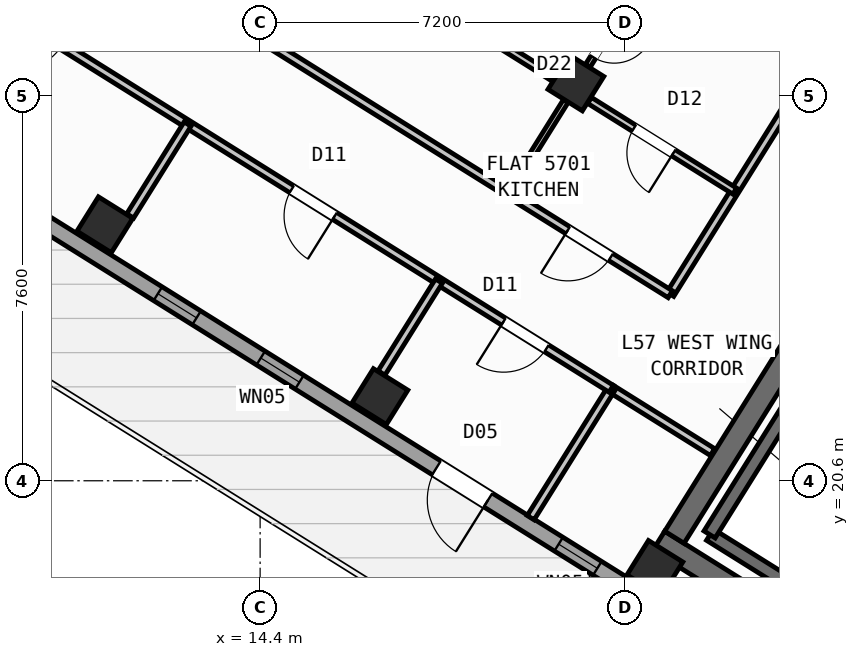
"""IFC4 building model, lengths in metres.
Left out: names, types, materials, properties, quantities, classifications, styles, units other than length and angle.
Written with IfcOpenShell. Run it as: python <this file> out.ifc"""

import sys

from ifc_helpers import new_model, si_unit, direction, frame, frame_2d, origin, origin_2d, place, context, subcontext, project, spatial, rectangle, hollow_rectangle, extrude, source, transform, mapped, element, fill, save


model = new_model("IFC4")
c1 = context("Model", 3, precision=1e-05, world=origin(), true_north=direction((0.0, 1.0)))
c2 = subcontext(c1, "Body", "Model", "MODEL_VIEW")
j1 = project(units=[si_unit("LENGTHUNIT", "METRE"), si_unit("PLANEANGLEUNIT", "RADIAN")], contexts=[c1])
p1 = place(None, origin())
s1 = spatial("IfcSite", under=j1, at=p1, CompositionType="ELEMENT")
p2 = place(p1, origin())
s2 = spatial("IfcBuilding", under=s1, at=p2, CompositionType="ELEMENT")
p3 = place(p2, frame((0.0, 0.0, 225.6)))
s3 = spatial("IfcBuildingStorey", under=s2, at=p3, CompositionType="ELEMENT", Elevation=225.6)
p4 = place(p3, frame((33.324, 12.503, 0.0), z_axis=(0.0, 0.0, 1.0), x_axis=(-0.848043529849, 0.529926571782, 0.0)))
e1 = element("IfcWall", 1, at=p4, inside=s3, PredefinedType="SHEAR", context=c2, shape_type="SweptSolid", body=[
    extrude(rectangle(XDim=13.04, YDim=0.45, at=frame_2d((6.52, 0.0))), origin(), (0.0, 0.0, 1.0), 3.35),
])
p5 = place(p3, frame((26.007, 24.976, 0.0), z_axis=(0.0, 0.0, 1.0), x_axis=(-0.529931155655, -0.848040665456, 0.0)))
e2 = element("IfcWall", 2, at=p5, inside=s3, PredefinedType="SHEAR", context=c2, shape_type="SweptSolid", body=[
    extrude(rectangle(XDim=6.475, YDim=0.45, at=frame_2d((3.238, 0.0))), origin(), (0.0, 0.0, 1.0), 3.35),
])
m1 = source(origin(), c2, "Body", "SweptSolid", [
    extrude(hollow_rectangle(XDim=0.8, YDim=0.8, WallThickness=0.032, at=origin_2d()), origin(), (0.0, 0.0, 1.0), 3.6),
])
for number, where, z_axis, x_axis in (
    (3, (22.191, 18.87, 0.0), (0.0, 0.0, 1.0), (-0.848, 0.53, 0.0)),
    (4, (20.632, 28.452, 0.0), (0.0, 0.0, 1.0), (-0.848, 0.53, 0.0)),
    (5, (16.764, 22.261, 0.0), (0.0, 0.0, 1.0), (-0.848, 0.53, 0.0)),
    (6, (11.336, 25.653, 0.0), (0.0, 0.0, 1.0), (-0.848, 0.53, 0.0)),
):
    element("IfcColumn", number, at=place(p3, frame(where, z_axis=z_axis, x_axis=x_axis)), inside=s3, PredefinedType="COLUMN", context=c2, shape_type="MappedRepresentation", body=[
        mapped(m1, transform((0.0, 0.0, 0.0), scale=1.0)),
    ])
p6 = place(p3, frame((31.76, 12.183, 0.0), z_axis=(0.0, 0.0, 1.0), x_axis=(-0.848047074256, 0.529920899612, 0.0)))
e7 = element("IfcWall", 7, at=p6, inside=s3, PredefinedType="STANDARD", context=c2, shape_type="SweptSolid", body=[
    extrude(rectangle(XDim=30.652, YDim=0.32, at=frame_2d((15.326, 0.0))), origin(), (0.0, 0.0, 1.0), 3.35),
])
p7 = place(p6, frame((15.166, 0.0, 0.0)))
e8 = element("IfcOpeningElement", 8, at=p7, cuts=e7, PredefinedType="OPENING", context=c2, shape_type="SweptSolid", body=[
    extrude(rectangle(XDim=1.2, YDim=2.15, at=frame_2d((0.6, 1.075))), frame((0.0, 0.17, 0.0), z_axis=(0.0, -1.0, 0.0), x_axis=(1.0, 0.0, 0.0)), (0.0, 0.0, 1.0), 0.34),
])
p8 = place(p6, frame((2.24, 0.0, 0.9)))
e9 = element("IfcOpeningElement", 9, at=p8, cuts=e7, PredefinedType="OPENING", context=c2, shape_type="SweptSolid", body=[
    extrude(rectangle(XDim=1.65, YDim=1.45, at=frame_2d((0.825, 0.725))), frame((0.0, 0.17, 0.0), z_axis=(0.0, -1.0, 0.0), x_axis=(1.0, 0.0, 0.0)), (0.0, 0.0, 1.0), 0.34),
])
p9 = place(p6, frame((7.469, 0.0, 0.9)))
e10 = element("IfcOpeningElement", 10, at=p9, cuts=e7, PredefinedType="OPENING", context=c2, shape_type="SweptSolid", body=[
    extrude(rectangle(XDim=1.65, YDim=1.45, at=frame_2d((0.825, 0.725))), frame((0.0, 0.17, 0.0), z_axis=(0.0, -1.0, 0.0), x_axis=(1.0, 0.0, 0.0)), (0.0, 0.0, 1.0), 0.34),
])
p10 = place(p6, frame((12.623, 0.0, 1.0)))
e11 = element("IfcOpeningElement", 11, at=p10, cuts=e7, PredefinedType="OPENING", context=c2, shape_type="SweptSolid", body=[
    extrude(rectangle(XDim=0.9, YDim=1.25, at=frame_2d((0.45, 0.625))), frame((0.0, 0.17, 0.0), z_axis=(0.0, -1.0, 0.0), x_axis=(1.0, 0.0, 0.0)), (0.0, 0.0, 1.0), 0.34),
])
p11 = place(p6, frame((19.556, 0.0, 1.0)))
e12 = element("IfcOpeningElement", 12, at=p11, cuts=e7, PredefinedType="OPENING", context=c2, shape_type="SweptSolid", body=[
    extrude(rectangle(XDim=0.9, YDim=1.25, at=frame_2d((0.45, 0.625))), frame((0.0, 0.17, 0.0), z_axis=(0.0, -1.0, 0.0), x_axis=(1.0, 0.0, 0.0)), (0.0, 0.0, 1.0), 0.34),
])
p12 = place(p6, frame((21.95, 0.0, 1.0)))
e13 = element("IfcOpeningElement", 13, at=p12, cuts=e7, PredefinedType="OPENING", context=c2, shape_type="SweptSolid", body=[
    extrude(rectangle(XDim=0.9, YDim=1.25, at=frame_2d((0.45, 0.625))), frame((0.0, 0.17, 0.0), z_axis=(0.0, -1.0, 0.0), x_axis=(1.0, 0.0, 0.0)), (0.0, 0.0, 1.0), 0.34),
])
p13 = place(p6, frame((26.983, 0.0, 0.9)))
e14 = element("IfcOpeningElement", 14, at=p13, cuts=e7, PredefinedType="OPENING", context=c2, shape_type="SweptSolid", body=[
    extrude(rectangle(XDim=1.35, YDim=1.45, at=frame_2d((0.675, 0.725))), frame((0.0, 0.17, 0.0), z_axis=(0.0, -1.0, 0.0), x_axis=(1.0, 0.0, 0.0)), (0.0, 0.0, 1.0), 0.34),
])
p14 = place(p3, frame((5.7, 28.71, 0.0), z_axis=(0.0, 0.0, 1.0), x_axis=(0.529923711467, 0.8480453172, 0.0)))
e15 = element("IfcWall", 15, at=p14, inside=s3, PredefinedType="STANDARD", context=c2, shape_type="SweptSolid", body=[
    extrude(rectangle(XDim=21.587, YDim=0.32, at=frame_2d((10.794, 0.0))), origin(), (0.0, 0.0, 1.0), 2.825),
])
p15 = place(p14, frame((1.329, 0.0, 1.0)))
e16 = element("IfcOpeningElement", 16, at=p15, cuts=e15, PredefinedType="OPENING", context=c2, shape_type="SweptSolid", body=[
    extrude(rectangle(XDim=0.9, YDim=1.25, at=frame_2d((0.45, 0.625))), frame((0.0, 0.17, 0.0), z_axis=(0.0, -1.0, 0.0), x_axis=(1.0, 0.0, 0.0)), (0.0, 0.0, 1.0), 0.34),
])
p16 = place(p14, frame((5.859, 0.0, 1.0)))
e17 = element("IfcOpeningElement", 17, at=p16, cuts=e15, PredefinedType="OPENING", context=c2, shape_type="SweptSolid", body=[
    extrude(rectangle(XDim=0.9, YDim=1.25, at=frame_2d((0.45, 0.625))), frame((0.0, 0.17, 0.0), z_axis=(0.0, -1.0, 0.0), x_axis=(1.0, 0.0, 0.0)), (0.0, 0.0, 1.0), 0.34),
])
p17 = place(p14, frame((10.369, 0.0, 0.95)))
e18 = element("IfcOpeningElement", 18, at=p17, cuts=e15, PredefinedType="OPENING", context=c2, shape_type="SweptSolid", body=[
    extrude(rectangle(XDim=1.95, YDim=1.35, at=frame_2d((0.975, 0.675))), frame((0.0, 0.17, 0.0), z_axis=(0.0, -1.0, 0.0), x_axis=(1.0, 0.0, 0.0)), (0.0, 0.0, 1.0), 0.34),
])
p18 = place(p14, frame((16.5, 0.0, 1.0)))
e19 = element("IfcOpeningElement", 19, at=p18, cuts=e15, PredefinedType="OPENING", context=c2, shape_type="SweptSolid", body=[
    extrude(rectangle(XDim=0.9, YDim=1.25, at=frame_2d((0.45, 0.625))), frame((0.0, 0.17, 0.0), z_axis=(0.0, -1.0, 0.0), x_axis=(1.0, 0.0, 0.0)), (0.0, 0.0, 1.0), 0.34),
])
p19 = place(p14, frame((18.913, 0.0, 1.0)))
e20 = element("IfcOpeningElement", 20, at=p19, cuts=e15, PredefinedType="OPENING", context=c2, shape_type="SweptSolid", body=[
    extrude(rectangle(XDim=0.9, YDim=1.25, at=frame_2d((0.45, 0.625))), frame((0.0, 0.17, 0.0), z_axis=(0.0, -1.0, 0.0), x_axis=(1.0, 0.0, 0.0)), (0.0, 0.0, 1.0), 0.34),
])
p20 = place(p3, frame((29.605, 15.581, 0.0), z_axis=(0.0, 0.0, 1.0), x_axis=(-0.848036911448, 0.529937163087, 0.0)))
e21 = element("IfcWall", 21, at=p20, inside=s3, PredefinedType="SHEAR", context=c2, shape_type="SweptSolid", body=[
    extrude(rectangle(XDim=7.46, YDim=0.26, at=frame_2d((3.73, 0.0))), origin(), (0.0, 0.0, 1.0), 3.35),
])
p21 = place(p3, frame((24.945, 22.22, 0.0), z_axis=(0.0, 0.0, 1.0), x_axis=(-0.529908658664, -0.84805472316, 0.0)))
e22 = element("IfcWall", 22, at=p21, inside=s3, PredefinedType="SHEAR", context=c2, shape_type="SweptSolid", body=[
    extrude(rectangle(XDim=3.16, YDim=0.26, at=frame_2d((1.58, 0.0))), origin(), (0.0, 0.0, 1.0), 3.35),
])
p22 = place(p3, frame((23.329, 21.166, 0.0), z_axis=(0.0, 0.0, 1.0), x_axis=(-0.848033204961, 0.529943094382, 0.0)))
e23 = element("IfcWall", 23, at=p22, inside=s3, PredefinedType="PARTITIONING", context=c2, shape_type="SweptSolid", body=[
    extrude(rectangle(XDim=2.358, YDim=0.16, at=frame_2d((1.179, 0.0))), origin(), (0.0, 0.0, 1.0), 3.34),
])
p23 = place(p3, frame((31.239, 38.274, 0.0), z_axis=(0.0, 0.0, 1.0), x_axis=(-0.529921796515, -0.848046513806, 0.0)))
e24 = element("IfcWall", 24, at=p23, inside=s3, PredefinedType="PARTITIONING", context=c2, shape_type="SweptSolid", body=[
    extrude(rectangle(XDim=16.5, YDim=0.16, at=frame_2d((8.25, 0.0))), origin(), (0.0, 0.0, 1.0), 3.34),
])
p24 = place(p3, frame((21.329, 22.416, 0.0), z_axis=(0.0, 0.0, 1.0), x_axis=(-0.529933104572, -0.848039447596, 0.0)))
e25 = element("IfcWall", 25, at=p24, inside=s3, PredefinedType="PARTITIONING", context=c2, shape_type="SweptSolid", body=[
    extrude(rectangle(XDim=3.0, YDim=0.16, at=frame_2d((1.5, 0.0))), origin(), (0.0, 0.0, 1.0), 3.34),
])
p25 = place(p3, frame((22.495, 24.281, 0.0), z_axis=(0.0, 0.0, 1.0), x_axis=(-0.848052408131, 0.529912363569, 0.0)))
e26 = element("IfcWall", 26, at=p25, inside=s3, PredefinedType="PARTITIONING", context=c2, shape_type="SweptSolid", body=[
    extrude(rectangle(XDim=16.73, YDim=0.16, at=frame_2d((8.365, 0.0))), origin(), (0.0, 0.0, 1.0), 3.34),
])
p26 = place(p25, frame((1.385, 0.0, 0.0)))
e27 = element("IfcOpeningElement", 27, at=p26, cuts=e26, PredefinedType="OPENING", context=c2, shape_type="SweptSolid", body=[
    extrude(rectangle(XDim=1.0, YDim=2.1, at=frame_2d((0.5, 1.05))), frame((0.0, 0.09, 0.0), z_axis=(0.0, -1.0, 0.0), x_axis=(1.0, 0.0, 0.0)), (0.0, 0.0, 1.0), 0.18),
])
p27 = place(p25, frame((14.76, 0.0, 0.0)))
e28 = element("IfcOpeningElement", 28, at=p27, cuts=e26, PredefinedType="OPENING", context=c2, shape_type="SweptSolid", body=[
    extrude(rectangle(XDim=1.0, YDim=2.1, at=frame_2d((0.5, 1.05))), frame((0.0, 0.09, 0.0), z_axis=(0.0, -1.0, 0.0), x_axis=(1.0, 0.0, 0.0)), (0.0, 0.0, 1.0), 0.18),
])
p28 = place(p3, frame((21.329, 22.416, 0.0), z_axis=(0.0, 0.0, 1.0), x_axis=(-0.848052408131, 0.529912363569, 0.0)))
e29 = element("IfcWall", 29, at=p28, inside=s3, PredefinedType="PARTITIONING", context=c2, shape_type="SweptSolid", body=[
    extrude(rectangle(XDim=16.73, YDim=0.16, at=frame_2d((8.365, 0.0))), origin(), (0.0, 0.0, 1.0), 3.34),
])
p29 = place(p28, frame((1.505, 0.0, 0.0)))
e30 = element("IfcOpeningElement", 30, at=p29, cuts=e29, PredefinedType="OPENING", context=c2, shape_type="SweptSolid", body=[
    extrude(rectangle(XDim=1.0, YDim=2.1, at=frame_2d((0.5, 1.05))), frame((0.0, 0.09, 0.0), z_axis=(0.0, -1.0, 0.0), x_axis=(1.0, 0.0, 0.0)), (0.0, 0.0, 1.0), 0.18),
])
p30 = place(p28, frame((6.435, 0.0, 0.0)))
e31 = element("IfcOpeningElement", 31, at=p30, cuts=e29, PredefinedType="OPENING", context=c2, shape_type="SweptSolid", body=[
    extrude(rectangle(XDim=1.0, YDim=2.1, at=frame_2d((0.5, 1.05))), frame((0.0, 0.09, 0.0), z_axis=(0.0, -1.0, 0.0), x_axis=(1.0, 0.0, 0.0)), (0.0, 0.0, 1.0), 0.18),
])
p31 = place(p28, frame((12.784, 0.0, 0.0)))
e32 = element("IfcOpeningElement", 32, at=p31, cuts=e29, PredefinedType="OPENING", context=c2, shape_type="SweptSolid", body=[
    extrude(rectangle(XDim=1.0, YDim=2.1, at=frame_2d((0.5, 1.05))), frame((0.0, 0.09, 0.0), z_axis=(0.0, -1.0, 0.0), x_axis=(1.0, 0.0, 0.0)), (0.0, 0.0, 1.0), 0.18),
])
p32 = place(p3, frame((17.928, 24.541, 0.0), z_axis=(0.0, 0.0, 1.0), x_axis=(-0.529844966244, -0.848094518167, 0.0)))
e33 = element("IfcWall", 33, at=p32, inside=s3, PredefinedType="PARTITIONING", context=c2, shape_type="SweptSolid", body=[
    extrude(rectangle(XDim=2.138, YDim=0.16, at=frame_2d((1.069, 0.0))), origin(), (0.0, 0.0, 1.0), 2.825),
])
p33 = place(p3, frame((12.968, 27.64, 0.0), z_axis=(0.0, 0.0, 1.0), x_axis=(-0.52989628283, -0.848062456098, 0.0)))
e34 = element("IfcWall", 34, at=p33, inside=s3, PredefinedType="PARTITIONING", context=c2, shape_type="SweptSolid", body=[
    extrude(rectangle(XDim=2.138, YDim=0.16, at=frame_2d((1.069, 0.0))), origin(), (0.0, 0.0, 1.0), 3.34),
])
p34 = place(p3, frame((24.299, 34.283, 0.0), z_axis=(0.0, 0.0, 1.0), x_axis=(-0.529890499457, -0.848066069705, 0.0)))
e35 = element("IfcWall", 35, at=p34, inside=s3, PredefinedType="PARTITIONING", context=c2, shape_type="SweptSolid", body=[
    extrude(rectangle(XDim=6.476, YDim=0.11, at=frame_2d((3.238, 0.0))), origin(), (0.0, 0.0, 1.0), 2.825),
])
p35 = place(p34, frame((5.496, 0.0, 0.0)))
e36 = element("IfcOpeningElement", 36, at=p35, cuts=e35, PredefinedType="OPENING", context=c2, shape_type="SweptSolid", body=[
    extrude(rectangle(XDim=0.78, YDim=2.05, at=frame_2d((0.39, 1.025))), frame((0.0, 0.065, 0.0), z_axis=(0.0, -1.0, 0.0), x_axis=(1.0, 0.0, 0.0)), (0.0, 0.0, 1.0), 0.13),
])
p36 = place(p3, frame((20.431, 28.092, 0.0), z_axis=(0.0, 0.0, 1.0), x_axis=(-0.529978410432, -0.848011134641, 0.0)))
e37 = element("IfcWall", 37, at=p36, inside=s3, PredefinedType="PARTITIONING", context=c2, shape_type="SweptSolid", body=[
    extrude(rectangle(XDim=2.138, YDim=0.11, at=frame_2d((1.069, 0.0))), origin(), (0.0, 0.0, 1.0), 2.825),
])
p37 = place(p3, frame((23.767, 26.316, 0.0), z_axis=(0.0, 0.0, 1.0), x_axis=(-0.848055143312, 0.529907986259, 0.0)))
e38 = element("IfcWall", 38, at=p37, inside=s3, PredefinedType="PLUMBINGWALL", context=c2, shape_type="SweptSolid", body=[
    extrude(rectangle(XDim=3.378, YDim=0.14, at=frame_2d((1.689, 0.0))), origin(), (0.0, 0.0, 1.0), 2.825),
])
p38 = place(p37, frame((1.425, 0.0, 0.0)))
e39 = element("IfcOpeningElement", 39, at=p38, cuts=e38, PredefinedType="OPENING", context=c2, shape_type="SweptSolid", body=[
    extrude(rectangle(XDim=0.92, YDim=2.08, at=frame_2d((0.46, 1.04))), frame((0.0, 0.08, 0.0), z_axis=(0.0, -1.0, 0.0), x_axis=(1.0, 0.0, 0.0)), (0.0, 0.0, 1.0), 0.16),
])
p39 = place(p3, frame((20.203, 28.543, 0.0), z_axis=(0.0, 0.0, 1.0), x_axis=(-0.848049955116, 0.529916289265, 0.0)))
e40 = element("IfcWall", 40, at=p39, inside=s3, PredefinedType="PLUMBINGWALL", context=c2, shape_type="SweptSolid", body=[
    extrude(rectangle(XDim=5.576, YDim=0.14, at=frame_2d((2.788, 0.0))), origin(), (0.0, 0.0, 1.0), 2.825),
])
p40 = place(p39, frame((2.338, 0.0, 0.0)))
e41 = element("IfcOpeningElement", 41, at=p40, cuts=e40, PredefinedType="OPENING", context=c2, shape_type="SweptSolid", body=[
    extrude(rectangle(XDim=0.78, YDim=2.05, at=frame_2d((0.39, 1.025))), frame((0.0, 0.08, 0.0), z_axis=(0.0, -1.0, 0.0), x_axis=(1.0, 0.0, 0.0)), (0.0, 0.0, 1.0), 0.16),
])
m2 = source(origin(), c2, "Body", "SweptSolid", [
    extrude(rectangle(XDim=1.2, YDim=2.15, at=frame_2d((0.6, 1.075))), frame((0.0, 0.025, 0.0), z_axis=(0.0, -1.0, 0.0), x_axis=(1.0, 0.0, 0.0)), (0.0, 0.0, 1.0), 0.05),
])
p41 = place(p7, origin())
e42 = element("IfcDoor", 42, at=p41, inside=s3, OperationType="SINGLE_SWING_LEFT", PredefinedType="DOOR", context=c2, shape_type="MappedRepresentation", body=[
    mapped(m2, transform((0.0, 0.0, 0.0), scale=1.0)),
])
fill(e8, e42)
m3 = source(origin(), c2, "Body", "SweptSolid", [
    extrude(rectangle(XDim=0.9, YDim=1.25, at=frame_2d((0.45, 0.625))), frame((0.0, 0.03, 0.0), z_axis=(0.0, -1.0, 0.0), x_axis=(1.0, 0.0, 0.0)), (0.0, 0.0, 1.0), 0.06),
])
p42 = place(p10, origin())
e43 = element("IfcWindow", 43, at=p42, inside=s3, PartitioningType="SINGLE_PANEL", PredefinedType="WINDOW", context=c2, shape_type="MappedRepresentation", body=[
    mapped(m3, transform((0.0, 0.0, 0.0), scale=1.0)),
])
fill(e11, e43)
p43 = place(p11, origin())
e44 = element("IfcWindow", 44, at=p43, inside=s3, PartitioningType="SINGLE_PANEL", PredefinedType="WINDOW", context=c2, shape_type="MappedRepresentation", body=[
    mapped(m3, transform((0.0, 0.0, 0.0), scale=1.0)),
])
fill(e12, e44)
p44 = place(p12, origin())
e45 = element("IfcWindow", 45, at=p44, inside=s3, PartitioningType="SINGLE_PANEL", PredefinedType="WINDOW", context=c2, shape_type="MappedRepresentation", body=[
    mapped(m3, transform((0.0, 0.0, 0.0), scale=1.0)),
])
fill(e13, e45)
m4 = source(origin(), c2, "Body", "SweptSolid", [
    extrude(rectangle(XDim=1.0, YDim=2.1, at=frame_2d((0.5, 1.05))), frame((0.0, 0.025, 0.0), z_axis=(0.0, -1.0, 0.0), x_axis=(1.0, 0.0, 0.0)), (0.0, 0.0, 1.0), 0.05),
])
p45 = place(p29, origin())
e46 = element("IfcDoor", 46, at=p45, inside=s3, OperationType="SINGLE_SWING_RIGHT", PredefinedType="DOOR", context=c2, shape_type="MappedRepresentation", body=[
    mapped(m4, transform((0.0, 0.0, 0.0), scale=1.0)),
])
fill(e30, e46)
p46 = place(p30, origin())
e47 = element("IfcDoor", 47, at=p46, inside=s3, OperationType="SINGLE_SWING_LEFT", PredefinedType="DOOR", context=c2, shape_type="MappedRepresentation", body=[
    mapped(m4, transform((0.0, 0.0, 0.0), scale=1.0)),
])
fill(e31, e47)
p47 = place(p26, origin())
e48 = element("IfcDoor", 48, at=p47, inside=s3, OperationType="SINGLE_SWING_RIGHT", PredefinedType="DOOR", context=c2, shape_type="MappedRepresentation", body=[
    mapped(m4, transform((0.0, 0.0, 0.0), scale=1.0)),
])
fill(e27, e48)
m5 = source(origin(), c2, "Body", "SweptSolid", [
    extrude(rectangle(XDim=0.92, YDim=2.08, at=frame_2d((0.46, 1.04))), frame((0.0, 0.025, 0.0), z_axis=(0.0, -1.0, 0.0), x_axis=(1.0, 0.0, 0.0)), (0.0, 0.0, 1.0), 0.05),
])
p48 = place(p38, origin())
e49 = element("IfcDoor", 49, at=p48, inside=s3, OperationType="SINGLE_SWING_LEFT", PredefinedType="DOOR", context=c2, shape_type="MappedRepresentation", body=[
    mapped(m5, transform((0.0, 0.0, 0.0), scale=1.0)),
])
fill(e39, e49)
m6 = source(origin(), c2, "Body", "SweptSolid", [
    extrude(rectangle(XDim=0.78, YDim=2.05, at=frame_2d((0.39, 1.025))), frame((0.0, 0.025, 0.0), z_axis=(0.0, -1.0, 0.0), x_axis=(1.0, 0.0, 0.0)), (0.0, 0.0, 1.0), 0.05),
])
p49 = place(p35, origin())
e50 = element("IfcDoor", 50, at=p49, inside=s3, OperationType="SINGLE_SWING_LEFT", PredefinedType="DOOR", context=c2, shape_type="MappedRepresentation", body=[
    mapped(m6, transform((0.0, 0.0, 0.0), scale=1.0)),
])
fill(e36, e50)
save(model, sys.argv[1])
